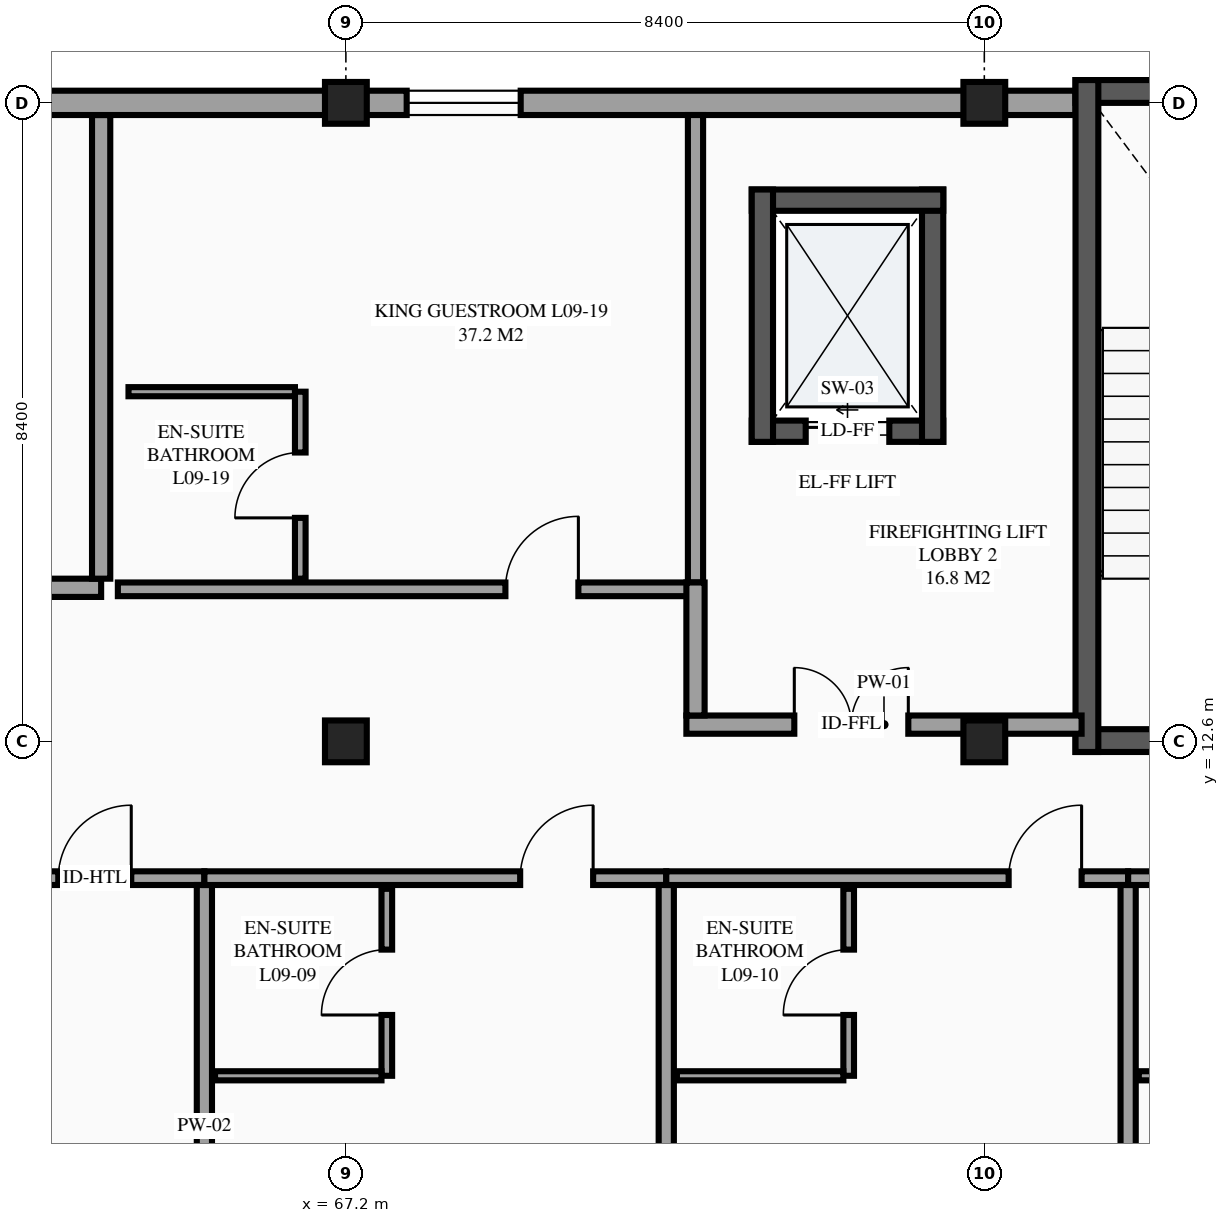
"""IFC4 building model, lengths in metres.
Left out: names, types, materials, properties, quantities, classifications, styles, units other than length and angle.
Written with IfcOpenShell. Run it as: python <this file> out.ifc"""

import sys

from ifc_helpers import new_model, si_unit, direction, frame, frame_2d, origin, origin_2d, place, context, subcontext, project, spatial, rectangle, extrude, element, fill, save


model = new_model("IFC4")
c1 = context("Model", 3, precision=1e-05, world=origin(), true_north=direction((0.0, 1.0)))
c2 = subcontext(c1, "Body", "Model", "MODEL_VIEW")
j1 = project(units=[si_unit("LENGTHUNIT", "METRE"), si_unit("PLANEANGLEUNIT", "RADIAN")], contexts=[c1])
p1 = place(None, origin())
s1 = spatial("IfcSite", under=j1, at=p1, CompositionType="ELEMENT")
p2 = place(p1, origin())
s2 = spatial("IfcBuilding", under=s1, at=p2, CompositionType="ELEMENT")
p3 = place(p2, frame((0.0, 0.0, 36.3)))
s3 = spatial("IfcBuildingStorey", under=s2, at=p3, CompositionType="ELEMENT", Elevation=36.3)
for number, where, z_axis, x_axis in (
    (1, (67.2, 12.6, 0.0), (0.0, 0.0, 1.0), (1.0, 0.0, 0.0)),
    (2, (67.2, 21.0, 0.0), (0.0, 0.0, 1.0), (1.0, 0.0, 0.0)),
    (3, (75.6, 12.6, 0.0), (0.0, 0.0, 1.0), (1.0, 0.0, 0.0)),
    (4, (75.6, 21.0, 0.0), (0.0, 0.0, 1.0), (1.0, 0.0, 0.0)),
):
    element("IfcColumn", number, at=place(p3, frame(where, z_axis=z_axis, x_axis=x_axis)), inside=s3, PredefinedType="COLUMN", context=c2, shape_type="SweptSolid", body=[
        extrude(rectangle(XDim=0.55, YDim=0.55, at=origin_2d()), origin(), (0.0, 0.0, 1.0), 3.6),
    ])
p4 = place(p3, frame((76.8, 21.0, 0.0), z_axis=(0.0, 0.0, 1.0), x_axis=(-1.0, 0.0, 0.0)))
e5 = element("IfcWall", 5, at=p4, inside=s3, PredefinedType="STANDARD", context=c2, shape_type="SweptSolid", body=[
    extrude(rectangle(XDim=9.6, YDim=0.32, at=frame_2d((4.8, 0.0))), origin(), (0.0, 0.0, 1.0), 2.68),
])
p5 = place(p4, frame((7.3, 0.0, 0.85)))
e6 = element("IfcOpeningElement", 6, at=p5, cuts=e5, PredefinedType="OPENING", context=c2, shape_type="SweptSolid", body=[
    extrude(rectangle(XDim=1.5, YDim=1.5, at=frame_2d((0.75, 0.75))), frame((0.0, 0.17, 0.0), z_axis=(0.0, -1.0, 0.0), x_axis=(1.0, 0.0, 0.0)), (0.0, 0.0, 1.0), 0.34),
])
p6 = place(p3, frame((72.54, 16.68, 0.0), z_axis=(0.0, 0.0, 1.0), x_axis=(1.0, 0.0, 0.0)))
e7 = element("IfcWall", 7, at=p6, inside=s3, PredefinedType="SHEAR", context=c2, shape_type="SweptSolid", body=[
    extrude(rectangle(XDim=2.52, YDim=0.28, at=frame_2d((1.26, 0.0))), origin(), (0.0, 0.0, 1.0), 3.6),
])
p7 = place(p6, frame((0.71, 0.0, 0.0)))
e8 = element("IfcOpeningElement", 8, at=p7, cuts=e7, PredefinedType="OPENING", context=c2, shape_type="SweptSolid", body=[
    extrude(rectangle(XDim=1.1, YDim=2.2, at=frame_2d((0.55, 1.1))), frame((0.0, 0.15, 0.0), z_axis=(0.0, -1.0, 0.0), x_axis=(1.0, 0.0, 0.0)), (0.0, 0.0, 1.0), 0.3),
])
p8 = place(p3, frame((74.92, 16.54, 0.0), z_axis=(0.0, 0.0, 1.0), x_axis=(0.0, 1.0, 0.0)))
e9 = element("IfcWall", 9, at=p8, inside=s3, PredefinedType="SHEAR", context=c2, shape_type="SweptSolid", body=[
    extrude(rectangle(XDim=3.32, YDim=0.28, at=frame_2d((1.66, 0.0))), origin(), (0.0, 0.0, 1.0), 3.6),
])
p9 = place(p3, frame((75.06, 19.72, 0.0), z_axis=(0.0, 0.0, 1.0), x_axis=(-1.0, 0.0, 0.0)))
e10 = element("IfcWall", 10, at=p9, inside=s3, PredefinedType="SHEAR", context=c2, shape_type="SweptSolid", body=[
    extrude(rectangle(XDim=2.52, YDim=0.28, at=frame_2d((1.26, 0.0))), origin(), (0.0, 0.0, 1.0), 3.6),
])
p10 = place(p3, frame((72.68, 19.86, 0.0), z_axis=(0.0, 0.0, 1.0), x_axis=(0.0, -1.0, 0.0)))
e11 = element("IfcWall", 11, at=p10, inside=s3, PredefinedType="SHEAR", context=c2, shape_type="SweptSolid", body=[
    extrude(rectangle(XDim=3.32, YDim=0.28, at=frame_2d((1.66, 0.0))), origin(), (0.0, 0.0, 1.0), 3.6),
])
p11 = place(p3, frame((76.8, 12.61, 0.0), z_axis=(0.0, 0.0, 1.0), x_axis=(1.0, 0.0, 0.0)))
e12 = element("IfcWall", 12, at=p11, inside=s3, PredefinedType="SHEAR", context=c2, shape_type="SweptSolid", body=[
    extrude(rectangle(XDim=5.2, YDim=0.3, at=frame_2d((2.6, 0.0))), origin(), (0.0, 0.0, 1.0), 3.6),
])
p12 = place(p11, frame((2.025, 0.0, 0.0)))
e13 = element("IfcOpeningElement", 13, at=p12, cuts=e12, PredefinedType="OPENING", context=c2, shape_type="SweptSolid", body=[
    extrude(rectangle(XDim=1.15, YDim=2.15, at=frame_2d((0.575, 1.075))), frame((0.0, 0.16, 0.0), z_axis=(0.0, -1.0, 0.0), x_axis=(1.0, 0.0, 0.0)), (0.0, 0.0, 1.0), 0.32),
])
p13 = place(p3, frame((82.0, 21.15, 0.0), z_axis=(0.0, 0.0, 1.0), x_axis=(-1.0, 0.0, 0.0)))
e14 = element("IfcWall", 14, at=p13, inside=s3, PredefinedType="SHEAR", context=c2, shape_type="SweptSolid", body=[
    extrude(rectangle(XDim=5.2, YDim=0.3, at=frame_2d((2.6, 0.0))), origin(), (0.0, 0.0, 1.0), 3.6),
])
p14 = place(p3, frame((76.95, 21.3, 0.0), z_axis=(0.0, 0.0, 1.0), x_axis=(0.0, -1.0, 0.0)))
e15 = element("IfcWall", 15, at=p14, inside=s3, PredefinedType="SHEAR", context=c2, shape_type="SweptSolid", body=[
    extrude(rectangle(XDim=8.84, YDim=0.3, at=frame_2d((4.42, 0.0))), origin(), (0.0, 0.0, 1.0), 3.6),
])
p15 = place(p3, frame((59.261, 10.8, 0.0), z_axis=(0.0, 0.0, 1.0), x_axis=(1.0, 0.0, 0.0)))
e16 = element("IfcWall", 16, at=p15, inside=s3, PredefinedType="PARTITIONING", context=c2, shape_type="SweptSolid", body=[
    extrude(rectangle(XDim=6.077, YDim=0.18, at=frame_2d((3.039, 0.0))), origin(), (0.0, 0.0, 1.0), 3.375),
])
p16 = place(p15, frame((4.155, 0.0, 0.0)))
e17 = element("IfcOpeningElement", 17, at=p16, cuts=e16, PredefinedType="OPENING", context=c2, shape_type="SweptSolid", body=[
    extrude(rectangle(XDim=0.96, YDim=2.15, at=frame_2d((0.48, 1.075))), frame((0.0, 0.1, 0.0), z_axis=(0.0, -1.0, 0.0), x_axis=(1.0, 0.0, 0.0)), (0.0, 0.0, 1.0), 0.2),
])
p17 = place(p3, frame((65.338, 4.36, 0.0), z_axis=(0.0, 0.0, 1.0), x_axis=(0.0, 1.0, 0.0)))
e18 = element("IfcWall", 18, at=p17, inside=s3, PredefinedType="PARTITIONING", context=c2, shape_type="SweptSolid", body=[
    extrude(rectangle(XDim=6.35, YDim=0.2, at=frame_2d((3.175, 0.0))), origin(), (0.0, 0.0, 1.0), 3.375),
])
p18 = place(p3, frame((65.338, 10.8, 0.0), z_axis=(0.0, 0.0, 1.0), x_axis=(1.0, 0.0, 0.0)))
e19 = element("IfcWall", 19, at=p18, inside=s3, PredefinedType="PARTITIONING", context=c2, shape_type="SweptSolid", body=[
    extrude(rectangle(XDim=6.077, YDim=0.18, at=frame_2d((3.039, 0.0))), origin(), (0.0, 0.0, 1.0), 3.375),
])
p19 = place(p18, frame((4.155, 0.0, 0.0)))
e20 = element("IfcOpeningElement", 20, at=p19, cuts=e19, PredefinedType="OPENING", context=c2, shape_type="SweptSolid", body=[
    extrude(rectangle(XDim=0.96, YDim=2.15, at=frame_2d((0.48, 1.075))), frame((0.0, 0.1, 0.0), z_axis=(0.0, -1.0, 0.0), x_axis=(1.0, 0.0, 0.0)), (0.0, 0.0, 1.0), 0.2),
])
p20 = place(p3, frame((71.415, 4.36, 0.0), z_axis=(0.0, 0.0, 1.0), x_axis=(0.0, 1.0, 0.0)))
e21 = element("IfcWall", 21, at=p20, inside=s3, PredefinedType="PARTITIONING", context=c2, shape_type="SweptSolid", body=[
    extrude(rectangle(XDim=6.35, YDim=0.2, at=frame_2d((3.175, 0.0))), origin(), (0.0, 0.0, 1.0), 3.375),
])
p21 = place(p3, frame((67.739, 8.2, 0.0), z_axis=(0.0, 0.0, 1.0), x_axis=(0.0, 1.0, 0.0)))
e22 = element("IfcWall", 22, at=p21, inside=s3, PredefinedType="PARTITIONING", context=c2, shape_type="SweptSolid", body=[
    extrude(rectangle(XDim=2.46, YDim=0.14, at=frame_2d((1.23, 0.0))), origin(), (0.0, 0.0, 1.0), 3.375),
])
p22 = place(p21, frame((0.8, 0.0, 0.0)))
e23 = element("IfcOpeningElement", 23, at=p22, cuts=e22, PredefinedType="OPENING", context=c2, shape_type="SweptSolid", body=[
    extrude(rectangle(XDim=0.86, YDim=2.1, at=frame_2d((0.43, 1.05))), frame((0.0, 0.08, 0.0), z_axis=(0.0, -1.0, 0.0), x_axis=(1.0, 0.0, 0.0)), (0.0, 0.0, 1.0), 0.16),
])
p23 = place(p3, frame((65.479, 8.2, 0.0), z_axis=(0.0, 0.0, 1.0), x_axis=(1.0, 0.0, 0.0)))
e24 = element("IfcWall", 24, at=p23, inside=s3, PredefinedType="PARTITIONING", context=c2, shape_type="SweptSolid", body=[
    extrude(rectangle(XDim=2.19, YDim=0.12, at=frame_2d((1.095, 0.0))), origin(), (0.0, 0.0, 1.0), 3.375),
])
p24 = place(p3, frame((71.415, 10.8, 0.0), z_axis=(0.0, 0.0, 1.0), x_axis=(1.0, 0.0, 0.0)))
e25 = element("IfcWall", 25, at=p24, inside=s3, PredefinedType="PARTITIONING", context=c2, shape_type="SweptSolid", body=[
    extrude(rectangle(XDim=6.077, YDim=0.18, at=frame_2d((3.039, 0.0))), origin(), (0.0, 0.0, 1.0), 3.375),
])
p25 = place(p24, frame((4.505, 0.0, 0.0)))
e26 = element("IfcOpeningElement", 26, at=p25, cuts=e25, PredefinedType="OPENING", context=c2, shape_type="SweptSolid", body=[
    extrude(rectangle(XDim=0.96, YDim=2.15, at=frame_2d((0.48, 1.075))), frame((0.0, 0.1, 0.0), z_axis=(0.0, -1.0, 0.0), x_axis=(1.0, 0.0, 0.0)), (0.0, 0.0, 1.0), 0.2),
])
p26 = place(p3, frame((77.492, 4.36, 0.0), z_axis=(0.0, 0.0, 1.0), x_axis=(0.0, 1.0, 0.0)))
e27 = element("IfcWall", 27, at=p26, inside=s3, PredefinedType="PARTITIONING", context=c2, shape_type="SweptSolid", body=[
    extrude(rectangle(XDim=6.35, YDim=0.2, at=frame_2d((3.175, 0.0))), origin(), (0.0, 0.0, 1.0), 3.375),
])
p27 = place(p3, frame((73.815, 8.2, 0.0), z_axis=(0.0, 0.0, 1.0), x_axis=(0.0, 1.0, 0.0)))
e28 = element("IfcWall", 28, at=p27, inside=s3, PredefinedType="PARTITIONING", context=c2, shape_type="SweptSolid", body=[
    extrude(rectangle(XDim=2.46, YDim=0.14, at=frame_2d((1.23, 0.0))), origin(), (0.0, 0.0, 1.0), 3.375),
])
p28 = place(p27, frame((0.8, 0.0, 0.0)))
e29 = element("IfcOpeningElement", 29, at=p28, cuts=e28, PredefinedType="OPENING", context=c2, shape_type="SweptSolid", body=[
    extrude(rectangle(XDim=0.86, YDim=2.1, at=frame_2d((0.43, 1.05))), frame((0.0, 0.08, 0.0), z_axis=(0.0, -1.0, 0.0), x_axis=(1.0, 0.0, 0.0)), (0.0, 0.0, 1.0), 0.16),
])
p29 = place(p3, frame((71.555, 8.2, 0.0), z_axis=(0.0, 0.0, 1.0), x_axis=(1.0, 0.0, 0.0)))
e30 = element("IfcWall", 30, at=p29, inside=s3, PredefinedType="PARTITIONING", context=c2, shape_type="SweptSolid", body=[
    extrude(rectangle(XDim=2.19, YDim=0.12, at=frame_2d((1.095, 0.0))), origin(), (0.0, 0.0, 1.0), 3.375),
])
p30 = place(p3, frame((77.492, 10.8, 0.0), z_axis=(0.0, 0.0, 1.0), x_axis=(1.0, 0.0, 0.0)))
e31 = element("IfcWall", 31, at=p30, inside=s3, PredefinedType="PARTITIONING", context=c2, shape_type="SweptSolid", body=[
    extrude(rectangle(XDim=6.077, YDim=0.18, at=frame_2d((3.039, 0.0))), origin(), (0.0, 0.0, 1.0), 3.375),
])
p31 = place(p30, frame((4.155, 0.0, 0.0)))
e32 = element("IfcOpeningElement", 32, at=p31, cuts=e31, PredefinedType="OPENING", context=c2, shape_type="SweptSolid", body=[
    extrude(rectangle(XDim=0.96, YDim=2.15, at=frame_2d((0.48, 1.075))), frame((0.0, 0.1, 0.0), z_axis=(0.0, -1.0, 0.0), x_axis=(1.0, 0.0, 0.0)), (0.0, 0.0, 1.0), 0.2),
])
p32 = place(p3, frame((77.632, 8.2, 0.0), z_axis=(0.0, 0.0, 1.0), x_axis=(1.0, 0.0, 0.0)))
e33 = element("IfcWall", 33, at=p32, inside=s3, PredefinedType="PARTITIONING", context=c2, shape_type="SweptSolid", body=[
    extrude(rectangle(XDim=2.19, YDim=0.12, at=frame_2d((1.095, 0.0))), origin(), (0.0, 0.0, 1.0), 3.375),
])
p33 = place(p3, frame((64.2, 14.6, 0.0), z_axis=(0.0, 0.0, 1.0), x_axis=(1.0, 0.0, 0.0)))
e34 = element("IfcWall", 34, at=p33, inside=s3, PredefinedType="PARTITIONING", context=c2, shape_type="SweptSolid", body=[
    extrude(rectangle(XDim=7.6, YDim=0.18, at=frame_2d((3.8, 0.0))), origin(), (0.0, 0.0, 1.0), 3.375),
])
p34 = place(p33, frame((5.099, 0.0, 0.0)))
e35 = element("IfcOpeningElement", 35, at=p34, cuts=e34, PredefinedType="OPENING", context=c2, shape_type="SweptSolid", body=[
    extrude(rectangle(XDim=0.96, YDim=2.15, at=frame_2d((0.48, 1.075))), frame((0.0, 0.1, 0.0), z_axis=(0.0, -1.0, 0.0), x_axis=(1.0, 0.0, 0.0)), (0.0, 0.0, 1.0), 0.2),
])
p35 = place(p3, frame((71.8, 14.69, 0.0), z_axis=(0.0, 0.0, 1.0), x_axis=(0.0, 1.0, 0.0)))
e36 = element("IfcWall", 36, at=p35, inside=s3, PredefinedType="PARTITIONING", context=c2, shape_type="SweptSolid", body=[
    extrude(rectangle(XDim=6.15, YDim=0.2, at=frame_2d((3.075, 0.0))), origin(), (0.0, 0.0, 1.0), 3.375),
])
p36 = place(p3, frame((66.6, 14.74, 0.0), z_axis=(0.0, 0.0, 1.0), x_axis=(0.0, 1.0, 0.0)))
e37 = element("IfcWall", 37, at=p36, inside=s3, PredefinedType="PARTITIONING", context=c2, shape_type="SweptSolid", body=[
    extrude(rectangle(XDim=2.46, YDim=0.14, at=frame_2d((1.23, 0.0))), origin(), (0.0, 0.0, 1.0), 3.375),
])
p37 = place(p36, frame((0.8, 0.0, 0.0)))
e38 = element("IfcOpeningElement", 38, at=p37, cuts=e37, PredefinedType="OPENING", context=c2, shape_type="SweptSolid", body=[
    extrude(rectangle(XDim=0.86, YDim=2.1, at=frame_2d((0.43, 1.05))), frame((0.0, 0.08, 0.0), z_axis=(0.0, -1.0, 0.0), x_axis=(1.0, 0.0, 0.0)), (0.0, 0.0, 1.0), 0.16),
])
p38 = place(p3, frame((64.34, 17.2, 0.0), z_axis=(0.0, 0.0, 1.0), x_axis=(1.0, 0.0, 0.0)))
e39 = element("IfcWall", 39, at=p38, inside=s3, PredefinedType="PARTITIONING", context=c2, shape_type="SweptSolid", body=[
    extrude(rectangle(XDim=2.19, YDim=0.12, at=frame_2d((1.095, 0.0))), origin(), (0.0, 0.0, 1.0), 3.375),
])
p39 = place(p3, frame((71.68, 12.82, 0.0), z_axis=(0.0, 0.0, 1.0), x_axis=(1.0, 0.0, 0.0)))
e40 = element("IfcWall", 40, at=p39, inside=s3, PredefinedType="PARTITIONING", context=c2, shape_type="SweptSolid", body=[
    extrude(rectangle(XDim=5.2, YDim=0.24, at=frame_2d((2.6, 0.0))), origin(), (0.0, 0.0, 1.0), 2.53),
])
p40 = place(p39, frame((1.42, 0.0, 0.0)))
e41 = element("IfcOpeningElement", 41, at=p40, cuts=e40, PredefinedType="OPENING", context=c2, shape_type="SweptSolid", body=[
    extrude(rectangle(XDim=1.5, YDim=2.15, at=frame_2d((0.75, 1.075))), frame((0.0, 0.13, 0.0), z_axis=(0.0, -1.0, 0.0), x_axis=(1.0, 0.0, 0.0)), (0.0, 0.0, 1.0), 0.26),
])
p41 = place(p3, frame((71.8, 12.94, 0.0), z_axis=(0.0, 0.0, 1.0), x_axis=(0.0, 1.0, 0.0)))
e42 = element("IfcWall", 42, at=p41, inside=s3, PredefinedType="PARTITIONING", context=c2, shape_type="SweptSolid", body=[
    extrude(rectangle(XDim=1.75, YDim=0.24, at=frame_2d((0.875, 0.0))), origin(), (0.0, 0.0, 1.0), 3.375),
])
p42 = place(p3, frame((51.02, 14.62, 0.0), z_axis=(0.0, 0.0, 1.0), x_axis=(1.0, 0.0, 0.0)))
e43 = element("IfcWall", 43, at=p42, inside=s3, PredefinedType="PARTITIONING", context=c2, shape_type="SweptSolid", body=[
    extrude(rectangle(XDim=12.96, YDim=0.24, at=frame_2d((6.48, 0.0))), origin(), (0.0, 0.0, 1.0), 3.375),
])
p43 = place(p42, frame((4.63, 0.0, 0.0)))
e44 = element("IfcOpeningElement", 44, at=p43, cuts=e43, PredefinedType="OPENING", context=c2, shape_type="SweptSolid", body=[
    extrude(rectangle(XDim=1.6, YDim=2.25, at=frame_2d((0.8, 1.125))), frame((0.0, 0.13, 0.0), z_axis=(0.0, -1.0, 0.0), x_axis=(1.0, 0.0, 0.0)), (0.0, 0.0, 1.0), 0.26),
])
p44 = place(p3, frame((63.98, 14.74, 0.0), z_axis=(0.0, 0.0, 1.0), x_axis=(0.0, 1.0, 0.0)))
e45 = element("IfcWall", 45, at=p44, inside=s3, PredefinedType="PARTITIONING", context=c2, shape_type="SweptSolid", body=[
    extrude(rectangle(XDim=6.1, YDim=0.24, at=frame_2d((3.05, 0.0))), origin(), (0.0, 0.0, 1.0), 3.375),
])
p45 = place(p3, frame((67.2, 21.0, 0.0), z_axis=(0.0, 0.0, 1.0), x_axis=(-1.0, 0.0, 0.0)))
e46 = element("IfcWall", 46, at=p45, inside=s3, PredefinedType="STANDARD", context=c2, shape_type="SweptSolid", body=[
    extrude(rectangle(XDim=8.4, YDim=0.32, at=frame_2d((4.2, 0.0))), origin(), (0.0, 0.0, 1.0), 3.07),
])
p46 = place(p5, origin())
e47 = element("IfcWindow", 47, at=p46, inside=s3, PartitioningType="SINGLE_PANEL", PredefinedType="WINDOW", context=c2, shape_type="SweptSolid", body=[
    extrude(rectangle(XDim=1.5, YDim=1.5, at=frame_2d((0.75, 0.75))), frame((0.0, 0.03, 0.0), z_axis=(0.0, -1.0, 0.0), x_axis=(1.0, 0.0, 0.0)), (0.0, 0.0, 1.0), 0.06),
])
fill(e6, e47)
p47 = place(p7, origin())
e48 = element("IfcDoor", 48, at=p47, inside=s3, OperationType="SLIDING_TO_LEFT", PredefinedType="DOOR", context=c2, shape_type="SweptSolid", body=[
    extrude(rectangle(XDim=1.1, YDim=2.2, at=frame_2d((0.55, 1.1))), frame((0.0, 0.025, 0.0), z_axis=(0.0, -1.0, 0.0), x_axis=(1.0, 0.0, 0.0)), (0.0, 0.0, 1.0), 0.05),
])
fill(e8, e48)
p48 = place(p16, origin())
e49 = element("IfcDoor", 49, at=p48, inside=s3, OperationType="SINGLE_SWING_RIGHT", PredefinedType="DOOR", context=c2, shape_type="SweptSolid", body=[
    extrude(rectangle(XDim=0.96, YDim=2.15, at=frame_2d((0.48, 1.075))), frame((0.0, 0.025, 0.0), z_axis=(0.0, -1.0, 0.0), x_axis=(1.0, 0.0, 0.0)), (0.0, 0.0, 1.0), 0.05),
])
fill(e17, e49)
p49 = place(p19, origin())
e50 = element("IfcDoor", 50, at=p49, inside=s3, OperationType="SINGLE_SWING_RIGHT", PredefinedType="DOOR", context=c2, shape_type="SweptSolid", body=[
    extrude(rectangle(XDim=0.96, YDim=2.15, at=frame_2d((0.48, 1.075))), frame((0.0, 0.025, 0.0), z_axis=(0.0, -1.0, 0.0), x_axis=(1.0, 0.0, 0.0)), (0.0, 0.0, 1.0), 0.05),
])
fill(e20, e50)
p50 = place(p22, origin())
e51 = element("IfcDoor", 51, at=p50, inside=s3, OperationType="SINGLE_SWING_LEFT", PredefinedType="DOOR", context=c2, shape_type="SweptSolid", body=[
    extrude(rectangle(XDim=0.86, YDim=2.1, at=frame_2d((0.43, 1.05))), frame((0.0, 0.025, 0.0), z_axis=(0.0, -1.0, 0.0), x_axis=(1.0, 0.0, 0.0)), (0.0, 0.0, 1.0), 0.05),
])
fill(e23, e51)
p51 = place(p25, origin())
e52 = element("IfcDoor", 52, at=p51, inside=s3, OperationType="SINGLE_SWING_RIGHT", PredefinedType="DOOR", context=c2, shape_type="SweptSolid", body=[
    extrude(rectangle(XDim=0.96, YDim=2.15, at=frame_2d((0.48, 1.075))), frame((0.0, 0.025, 0.0), z_axis=(0.0, -1.0, 0.0), x_axis=(1.0, 0.0, 0.0)), (0.0, 0.0, 1.0), 0.05),
])
fill(e26, e52)
p52 = place(p28, origin())
e53 = element("IfcDoor", 53, at=p52, inside=s3, OperationType="SINGLE_SWING_LEFT", PredefinedType="DOOR", context=c2, shape_type="SweptSolid", body=[
    extrude(rectangle(XDim=0.86, YDim=2.1, at=frame_2d((0.43, 1.05))), frame((0.0, 0.025, 0.0), z_axis=(0.0, -1.0, 0.0), x_axis=(1.0, 0.0, 0.0)), (0.0, 0.0, 1.0), 0.05),
])
fill(e29, e53)
p53 = place(p34, origin())
e54 = element("IfcDoor", 54, at=p53, inside=s3, OperationType="SINGLE_SWING_RIGHT", PredefinedType="DOOR", context=c2, shape_type="SweptSolid", body=[
    extrude(rectangle(XDim=0.96, YDim=2.15, at=frame_2d((0.48, 1.075))), frame((0.0, 0.025, 0.0), z_axis=(0.0, -1.0, 0.0), x_axis=(1.0, 0.0, 0.0)), (0.0, 0.0, 1.0), 0.05),
])
fill(e35, e54)
p54 = place(p37, origin())
e55 = element("IfcDoor", 55, at=p54, inside=s3, OperationType="SINGLE_SWING_LEFT", PredefinedType="DOOR", context=c2, shape_type="SweptSolid", body=[
    extrude(rectangle(XDim=0.86, YDim=2.1, at=frame_2d((0.43, 1.05))), frame((0.0, 0.025, 0.0), z_axis=(0.0, -1.0, 0.0), x_axis=(1.0, 0.0, 0.0)), (0.0, 0.0, 1.0), 0.05),
])
fill(e38, e55)
p55 = place(p40, origin())
e56 = element("IfcDoor", 56, at=p55, inside=s3, OperationType="DOUBLE_DOOR_SINGLE_SWING", PredefinedType="DOOR", context=c2, shape_type="SweptSolid", body=[
    extrude(rectangle(XDim=1.5, YDim=2.15, at=frame_2d((0.75, 1.075))), frame((0.0, 0.025, 0.0), z_axis=(0.0, -1.0, 0.0), x_axis=(1.0, 0.0, 0.0)), (0.0, 0.0, 1.0), 0.05),
])
fill(e41, e56)
save(model, sys.argv[1])
